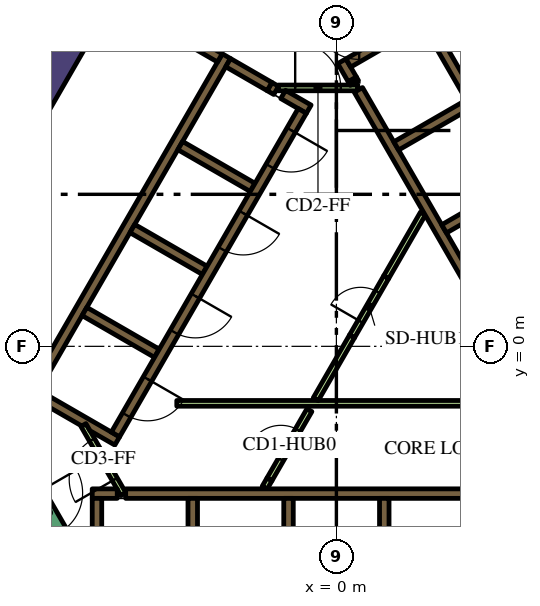
"""IFC4 building model, lengths in metres.
Left out: names, types, materials, properties, quantities, classifications, styles, units other than length and angle.
Written with IfcOpenShell. Run it as: python <this file> out.ifc"""

import sys

from ifc_helpers import new_model, si_unit, direction, frame, frame_2d, origin, place, context, subcontext, project, spatial, polyline, rectangle, outline, extrude, element, fill, save


model = new_model("IFC4")
c1 = context("Model", 3, precision=1e-05, world=origin(), true_north=direction((0.0, 1.0)))
c2 = subcontext(c1, "Body", "Model", "MODEL_VIEW")
j1 = project(units=[si_unit("LENGTHUNIT", "METRE"), si_unit("PLANEANGLEUNIT", "RADIAN")], contexts=[c1])
p1 = place(None, origin())
s1 = spatial("IfcSite", under=j1, at=p1, CompositionType="ELEMENT")
p2 = place(p1, origin())
s2 = spatial("IfcBuilding", under=s1, at=p2, CompositionType="ELEMENT")
p3 = place(p2, frame((0.0, 0.0, 166.8)))
s3 = spatial("IfcBuildingStorey", under=s2, at=p3, CompositionType="ELEMENT", Elevation=166.8)
p4 = place(p3, frame((8.279, 5.761, 0.0), z_axis=(0.0, 0.0, 1.0), x_axis=(-0.500010359015, 0.866019422922, 0.0)))
e1 = element("IfcWall", 1, at=p4, inside=s3, PredefinedType="SOLIDWALL", context=c2, shape_type="SweptSolid", body=[
    extrude(rectangle(XDim=12.528, YDim=0.8, at=frame_2d((6.264, 0.0))), origin(), (0.0, 0.0, 1.0), 4.2),
])
p5 = place(p3, frame((-12.668, -1.842, 0.0), z_axis=(0.0, 0.0, 1.0), x_axis=(0.500003640647, 0.866023301845, 0.0)))
e2 = element("IfcWall", 2, at=p5, inside=s3, PredefinedType="SOLIDWALL", context=c2, shape_type="SweptSolid", body=[
    extrude(rectangle(XDim=15.858, YDim=0.8, at=frame_2d((7.929, 0.0))), origin(), (0.0, 0.0, 1.0), 4.2),
])
p6 = place(p3, frame((-5.545, -3.875, 0.0), z_axis=(0.0, 0.0, 1.0), x_axis=(1.0, 0.0, 0.0)))
e3 = element("IfcWall", 3, at=p6, inside=s3, PredefinedType="SOLIDWALL", context=c2, shape_type="SweptSolid", body=[
    extrude(rectangle(XDim=11.97, YDim=0.25, at=frame_2d((5.985, 0.0))), origin(), (0.0, 0.0, 1.0), 4.2),
])
p7 = place(p3, frame((-6.425, -3.875, 0.0), z_axis=(0.0, 0.0, 1.0), x_axis=(1.0, 0.0, 0.0)))
e4 = element("IfcWall", 4, at=p7, inside=s3, PredefinedType="SOLIDWALL", context=c2, shape_type="SweptSolid", body=[
    extrude(rectangle(XDim=0.658, YDim=0.25, at=frame_2d((0.329, 0.0))), origin(), (0.0, 0.0, 1.0), 4.2),
])
for number, where, z_axis, x_axis in (
    (5, (1.26, -4.0, 0.0), (0.0, 0.0, 1.0), (0.0, -1.0, 0.0)),
    (6, (-1.26, -4.0, 0.0), (0.0, 0.0, 1.0), (0.0, -1.0, 0.0)),
    (7, (-3.78, -4.0, 0.0), (0.0, 0.0, 1.0), (0.0, -1.0, 0.0)),
):
    element("IfcWall", number, at=place(p3, frame(where, z_axis=z_axis, x_axis=x_axis)), inside=s3, PredefinedType="SOLIDWALL", context=c2, shape_type="SweptSolid", body=[
        extrude(rectangle(XDim=2.2, YDim=0.25, at=frame_2d((1.1, 0.0))), origin(), (0.0, 0.0, 1.0), 4.2),
    ])
p8 = place(p3, frame((-6.3, -7.125, 0.0), z_axis=(0.0, 0.0, 1.0), x_axis=(0.0, 1.0, 0.0)))
e8 = element("IfcWall", 8, at=p8, inside=s3, PredefinedType="SOLIDWALL", context=c2, shape_type="SweptSolid", body=[
    extrude(rectangle(XDim=3.125, YDim=0.25, at=frame_2d((1.562, 0.0))), origin(), (0.0, 0.0, 1.0), 4.2),
])
p9 = place(p3, frame((0.473, 6.93, 0.0), z_axis=(0.0, 0.0, 1.0), x_axis=(-0.49972245349, 0.866185586049, 0.0)))
e9 = element("IfcWall", 9, at=p9, inside=s3, PredefinedType="SOLIDWALL", context=c2, shape_type="SweptSolid", body=[
    extrude(rectangle(XDim=0.11, YDim=0.25, at=frame_2d((0.055, 0.0))), origin(), (0.0, 0.0, 1.0), 4.2),
])
p10 = place(p3, frame((6.568, -3.627, 0.0), z_axis=(0.0, 0.0, 1.0), x_axis=(-0.499999455981, 0.866025717874, 0.0)))
e10 = element("IfcWall", 10, at=p10, inside=s3, PredefinedType="SOLIDWALL", context=c2, shape_type="SweptSolid", body=[
    extrude(rectangle(XDim=11.978, YDim=0.25, at=frame_2d((5.989, 0.0))), origin(), (0.0, 0.0, 1.0), 4.2),
])
p11 = place(p3, frame((0.417, 7.027, 0.0), z_axis=(0.0, 0.0, 1.0), x_axis=(-0.500210807569, 0.865903659763, 0.0)))
e11 = element("IfcWall", 11, at=p11, inside=s3, PredefinedType="SOLIDWALL", context=c2, shape_type="SweptSolid", body=[
    extrude(rectangle(XDim=0.548, YDim=0.25, at=frame_2d((0.274, 0.0))), origin(), (0.0, 0.0, 1.0), 4.2),
])
p12 = place(p3, frame((3.1, 9.064, 0.0), z_axis=(0.0, 0.0, 1.0), x_axis=(-0.866030133475, -0.499991807846, 0.0)))
e12 = element("IfcWall", 12, at=p12, inside=s3, PredefinedType="SOLIDWALL", context=c2, shape_type="SweptSolid", body=[
    extrude(rectangle(XDim=3.217, YDim=0.25, at=frame_2d((1.608, 0.0))), origin(), (0.0, 0.0, 1.0), 4.2),
])
p13 = place(p3, frame((1.574, 5.274, 0.0), z_axis=(0.0, 0.0, 1.0), x_axis=(0.866028486751, 0.499994660107, 0.0)))
e13 = element("IfcWall", 13, at=p13, inside=s3, PredefinedType="SOLIDWALL", context=c2, shape_type="SweptSolid", body=[
    extrude(rectangle(XDim=2.2, YDim=0.25, at=frame_2d((1.1, 0.0))), origin(), (0.0, 0.0, 1.0), 4.2),
])
p14 = place(p3, frame((2.834, 3.091, 0.0), z_axis=(0.0, 0.0, 1.0), x_axis=(0.866008176907, 0.50002983664, 0.0)))
e14 = element("IfcWall", 14, at=p14, inside=s3, PredefinedType="SOLIDWALL", context=c2, shape_type="SweptSolid", body=[
    extrude(rectangle(XDim=2.2, YDim=0.25, at=frame_2d((1.1, 0.0))), origin(), (0.0, 0.0, 1.0), 4.2),
])
p15 = place(p3, frame((-8.06, -1.311, 0.0), z_axis=(0.0, 0.0, 1.0), x_axis=(0.50000273126, 0.866023826885, 0.0)))
e15 = element("IfcWall", 15, at=p15, inside=s3, PredefinedType="SOLIDWALL", context=c2, shape_type="SweptSolid", body=[
    extrude(rectangle(XDim=10.33, YDim=0.25, at=frame_2d((5.165, 0.0))), origin(), (0.0, 0.0, 1.0), 4.2),
])
p16 = place(p3, frame((-1.758, 6.835, 0.0), z_axis=(0.0, 0.0, 1.0), x_axis=(0.865982457891, -0.500074377092, 0.0)))
e16 = element("IfcWall", 16, at=p16, inside=s3, PredefinedType="SOLIDWALL", context=c2, shape_type="SweptSolid", body=[
    extrude(rectangle(XDim=0.2, YDim=0.25, at=frame_2d((0.1, 0.0))), origin(), (0.0, 0.0, 1.0), 4.2),
])
p17 = place(p3, frame((-1.76, 6.836, 0.0), z_axis=(0.0, 0.0, 1.0), x_axis=(-0.865952863304, 0.500125622755, 0.0)))
e17 = element("IfcWall", 17, at=p17, inside=s3, PredefinedType="SOLIDWALL", context=c2, shape_type="SweptSolid", body=[
    extrude(rectangle(XDim=1.258, YDim=0.25, at=frame_2d((0.629, 0.0))), origin(), (0.0, 0.0, 1.0), 4.2),
])
p18 = place(p3, frame((-0.728, 6.24, 0.0), z_axis=(0.0, 0.0, 1.0), x_axis=(-0.865955664968, 0.500120771724, 0.0)))
e18 = element("IfcWall", 18, at=p18, inside=s3, PredefinedType="SOLIDWALL", context=c2, shape_type="SweptSolid", body=[
    extrude(rectangle(XDim=0.778, YDim=0.25, at=frame_2d((0.389, 0.0))), origin(), (0.0, 0.0, 1.0), 4.2),
])
for number, where, z_axis, x_axis in (
    (19, (-2.204, 4.182, 0.0), (0.0, 0.0, 1.0), (-0.866, 0.5, 0.0)),
    (20, (-5.369, 3.1, 0.0), (0.0, 0.0, 1.0), (0.866, -0.5, 0.0)),
    (21, (-4.724, -0.182, 0.0), (0.0, 0.0, 1.0), (-0.866, 0.5, 0.0)),
):
    element("IfcWall", number, at=place(p3, frame(where, z_axis=z_axis, x_axis=x_axis)), inside=s3, PredefinedType="SOLIDWALL", context=c2, shape_type="SweptSolid", body=[
        extrude(rectangle(XDim=2.2, YDim=0.25, at=frame_2d((1.1, 0.0))), origin(), (0.0, 0.0, 1.0), 4.2),
    ])
p19 = place(p3, origin())
e22 = element("IfcWall", 22, at=p19, inside=s3, PredefinedType="SOLIDWALL", context=c2, shape_type="SweptSolid", body=[
    extrude(outline(polyline([(-5.922, -2.257), (-5.922, -2.257), (-5.705, -2.382), (-5.83, -2.598), (-6.483, -2.221), (-6.591, -2.033), (-6.591, -2.033), (-6.7, -2.096), (-7.952, -1.373), (-7.827, -1.156), (-5.922, -2.257)])), origin(), (0.0, 0.0, 1.0), 4.2),
])
p20 = place(p3, frame((-3.066, 7.59, 0.0), z_axis=(0.0, 0.0, 1.0), x_axis=(-0.866081358704, 0.49990307071, 0.0)))
e23 = element("IfcWall", 23, at=p20, inside=s3, PredefinedType="SOLIDWALL", context=c2, shape_type="SweptSolid", body=[
    extrude(rectangle(XDim=0.858, YDim=0.25, at=frame_2d((0.429, 0.0))), origin(), (0.0, 0.0, 1.0), 4.2),
])
p21 = place(p3, frame((-4.2, -1.5, 0.0), z_axis=(0.0, 0.0, 1.0), x_axis=(1.0, 0.0, 0.0)))
e24 = element("IfcWall", 24, at=p21, inside=s3, PredefinedType="PARTITIONING", context=c2, shape_type="SweptSolid", body=[
    extrude(rectangle(XDim=9.359, YDim=0.15, at=frame_2d((4.68, 0.0))), origin(), (0.0, 0.0, 1.0), 3.15),
])
p22 = place(p3, frame((-0.544, -1.393, 0.0), z_axis=(0.0, 0.0, 1.0), x_axis=(0.499928740635, 0.866066541489, 0.0)))
e25 = element("IfcWall", 25, at=p22, inside=s3, PredefinedType="PARTITIONING", context=c2, shape_type="SweptSolid", body=[
    extrude(rectangle(XDim=1.912, YDim=0.15, at=frame_2d((0.956, 0.0))), origin(), (0.0, 0.0, 1.0), 3.15),
])
p23 = place(p3, frame((1.312, 1.822, 0.0), z_axis=(0.0, 0.0, 1.0), x_axis=(0.500003549559, 0.866023354436, 0.0)))
e26 = element("IfcWall", 26, at=p23, inside=s3, PredefinedType="PARTITIONING", context=c2, shape_type="SweptSolid", body=[
    extrude(rectangle(XDim=1.93, YDim=0.15, at=frame_2d((0.965, 0.0))), origin(), (0.0, 0.0, 1.0), 3.15),
])
p24 = place(p3, frame((-1.887, -3.718, 0.0), z_axis=(0.0, 0.0, 1.0), x_axis=(0.500165633897, 0.865929753888, 0.0)))
e27 = element("IfcWall", 27, at=p24, inside=s3, PredefinedType="PARTITIONING", context=c2, shape_type="SweptSolid", body=[
    extrude(rectangle(XDim=0.254, YDim=0.15, at=frame_2d((0.127, 0.0))), origin(), (0.0, 0.0, 1.0), 3.15),
])
p25 = place(p3, frame((8.565, -2.185, 0.0), z_axis=(0.0, 0.0, 1.0), x_axis=(-0.499997954832, 0.866026584559, 0.0)))
e28 = element("IfcWall", 28, at=p25, inside=s3, PredefinedType="SOLIDWALL", context=c2, shape_type="SweptSolid", body=[
    extrude(rectangle(XDim=12.35, YDim=0.25, at=frame_2d((6.175, 0.0))), origin(), (0.0, 0.0, 1.0), 4.2),
])
p26 = place(p25, frame((0.585, 0.0, 0.0)))
e29 = element("IfcOpeningElement", 29, at=p26, cuts=e28, PredefinedType="OPENING", context=c2, shape_type="SweptSolid", body=[
    extrude(rectangle(XDim=1.1, YDim=2.1, at=frame_2d((0.55, 1.05))), frame((0.0, 0.135, 0.0), z_axis=(0.0, -1.0, 0.0), x_axis=(1.0, 0.0, 0.0)), (0.0, 0.0, 1.0), 0.27),
])
p27 = place(p3, frame((-0.898, 6.194, 0.0), z_axis=(0.0, 0.0, 1.0), x_axis=(-0.499996202215, -0.866027596426, 0.0)))
e30 = element("IfcWall", 30, at=p27, inside=s3, PredefinedType="SOLIDWALL", context=c2, shape_type="SweptSolid", body=[
    extrude(rectangle(XDim=9.83, YDim=0.25, at=frame_2d((4.915, 0.0))), origin(), (0.0, 0.0, 1.0), 4.2),
])
p28 = place(p27, frame((0.585, 0.0, 0.0)))
e31 = element("IfcOpeningElement", 31, at=p28, cuts=e30, PredefinedType="OPENING", context=c2, shape_type="SweptSolid", body=[
    extrude(rectangle(XDim=1.1, YDim=2.1, at=frame_2d((0.55, 1.05))), frame((0.0, 0.135, 0.0), z_axis=(0.0, -1.0, 0.0), x_axis=(1.0, 0.0, 0.0)), (0.0, 0.0, 1.0), 0.27),
])
p29 = place(p27, frame((3.105, 0.0, 0.0)))
e32 = element("IfcOpeningElement", 32, at=p29, cuts=e30, PredefinedType="OPENING", context=c2, shape_type="SweptSolid", body=[
    extrude(rectangle(XDim=1.1, YDim=2.1, at=frame_2d((0.55, 1.05))), frame((0.0, 0.135, 0.0), z_axis=(0.0, -1.0, 0.0), x_axis=(1.0, 0.0, 0.0)), (0.0, 0.0, 1.0), 0.27),
])
p30 = place(p27, frame((5.625, 0.0, 0.0)))
e33 = element("IfcOpeningElement", 33, at=p30, cuts=e30, PredefinedType="OPENING", context=c2, shape_type="SweptSolid", body=[
    extrude(rectangle(XDim=1.1, YDim=2.1, at=frame_2d((0.55, 1.05))), frame((0.0, 0.135, 0.0), z_axis=(0.0, -1.0, 0.0), x_axis=(1.0, 0.0, 0.0)), (0.0, 0.0, 1.0), 0.27),
])
p31 = place(p27, frame((8.145, 0.0, 0.0)))
e34 = element("IfcOpeningElement", 34, at=p31, cuts=e30, PredefinedType="OPENING", context=c2, shape_type="SweptSolid", body=[
    extrude(rectangle(XDim=1.1, YDim=2.1, at=frame_2d((0.55, 1.05))), frame((0.0, 0.135, 0.0), z_axis=(0.0, -1.0, 0.0), x_axis=(1.0, 0.0, 0.0)), (0.0, 0.0, 1.0), 0.27),
])
p32 = place(p3, frame((-8.103, -3.466, 0.0), z_axis=(0.0, 0.0, 1.0), x_axis=(0.500078061341, -0.865980330357, 0.0)))
e35 = element("IfcWall", 35, at=p32, inside=s3, PredefinedType="SOLIDWALL", context=c2, shape_type="SweptSolid", body=[
    extrude(rectangle(XDim=2.1, YDim=0.4, at=frame_2d((1.05, 0.0))), origin(), (0.0, 0.0, 1.0), 4.2),
])
p33 = place(p32, frame((0.45, 0.0, 0.0)))
e36 = element("IfcOpeningElement", 36, at=p33, cuts=e35, PredefinedType="OPENING", context=c2, shape_type="SweptSolid", body=[
    extrude(rectangle(XDim=1.2, YDim=2.1, at=frame_2d((0.6, 1.05))), frame((0.0, 0.21, 0.0), z_axis=(0.0, -1.0, 0.0), x_axis=(1.0, 0.0, 0.0)), (0.0, 0.0, 1.0), 0.42),
])
p34 = place(p3, frame((-1.76, -3.498, 0.0), z_axis=(0.0, 0.0, 1.0), x_axis=(0.499977374825, 0.866038466041, 0.0)))
e37 = element("IfcWall", 37, at=p34, inside=s3, PredefinedType="PARTITIONING", context=c2, shape_type="SweptSolid", body=[
    extrude(rectangle(XDim=2.1, YDim=0.15, at=frame_2d((1.05, 0.0))), origin(), (0.0, 0.0, 1.0), 3.15),
])
p35 = place(p34, frame((0.6, 0.0, 0.0)))
e38 = element("IfcOpeningElement", 38, at=p35, cuts=e37, PredefinedType="OPENING", context=c2, shape_type="SweptSolid", body=[
    extrude(rectangle(XDim=0.9, YDim=2.1, at=frame_2d((0.45, 1.05))), frame((0.0, 0.085, 0.0), z_axis=(0.0, -1.0, 0.0), x_axis=(1.0, 0.0, 0.0)), (0.0, 0.0, 1.0), 0.17),
])
p36 = place(p3, frame((-1.534, 6.8, 0.0), z_axis=(0.0, 0.0, 1.0), x_axis=(1.0, 0.0, 0.0)))
e39 = element("IfcWall", 39, at=p36, inside=s3, PredefinedType="PARTITIONING", context=c2, shape_type="SweptSolid", body=[
    extrude(rectangle(XDim=2.1, YDim=0.15, at=frame_2d((1.05, 0.0))), origin(), (0.0, 0.0, 1.0), 3.15),
])
p37 = place(p36, frame((0.45, 0.0, 0.0)))
e40 = element("IfcOpeningElement", 40, at=p37, cuts=e39, PredefinedType="OPENING", context=c2, shape_type="SweptSolid", body=[
    extrude(rectangle(XDim=1.2, YDim=2.1, at=frame_2d((0.6, 1.05))), frame((0.0, 0.085, 0.0), z_axis=(0.0, -1.0, 0.0), x_axis=(1.0, 0.0, 0.0)), (0.0, 0.0, 1.0), 0.17),
])
p38 = place(p3, frame((-5.606, -3.89, 0.0), z_axis=(0.0, 0.0, 1.0), x_axis=(-0.500027713859, 0.866009402589, 0.0)))
e41 = element("IfcWall", 41, at=p38, inside=s3, PredefinedType="PARTITIONING", context=c2, shape_type="SweptSolid", body=[
    extrude(rectangle(XDim=2.1, YDim=0.15, at=frame_2d((1.05, 0.0))), origin(), (0.0, 0.0, 1.0), 3.15),
])
p39 = place(p38, frame((0.45, 0.0, 0.0)))
e42 = element("IfcOpeningElement", 42, at=p39, cuts=e41, PredefinedType="OPENING", context=c2, shape_type="SweptSolid", body=[
    extrude(rectangle(XDim=1.2, YDim=2.1, at=frame_2d((0.6, 1.05))), frame((0.0, 0.085, 0.0), z_axis=(0.0, -1.0, 0.0), x_axis=(1.0, 0.0, 0.0)), (0.0, 0.0, 1.0), 0.17),
])
p40 = place(p3, frame((0.412, 0.263, 0.0), z_axis=(0.0, 0.0, 1.0), x_axis=(0.500062916607, 0.865989075817, 0.0)))
e43 = element("IfcWall", 43, at=p40, inside=s3, PredefinedType="PARTITIONING", context=c2, shape_type="SweptSolid", body=[
    extrude(rectangle(XDim=1.8, YDim=0.15, at=frame_2d((0.9, 0.0))), origin(), (0.0, 0.0, 1.0), 3.15),
])
p41 = place(p40, frame((0.45, 0.0, 0.0)))
e44 = element("IfcOpeningElement", 44, at=p41, cuts=e43, PredefinedType="OPENING", context=c2, shape_type="SweptSolid", body=[
    extrude(rectangle(XDim=0.9, YDim=2.1, at=frame_2d((0.45, 1.05))), frame((0.0, 0.085, 0.0), z_axis=(0.0, -1.0, 0.0), x_axis=(1.0, 0.0, 0.0)), (0.0, 0.0, 1.0), 0.17),
])
p42 = place(p28, origin())
e45 = element("IfcDoor", 45, at=p42, inside=s3, OperationType="DOUBLE_DOOR_SLIDING", PredefinedType="DOOR", context=c2, shape_type="SweptSolid", body=[
    extrude(rectangle(XDim=1.1, YDim=2.1, at=frame_2d((0.55, 1.05))), frame((0.0, 0.025, 0.0), z_axis=(0.0, -1.0, 0.0), x_axis=(1.0, 0.0, 0.0)), (0.0, 0.0, 1.0), 0.05),
])
fill(e31, e45)
p43 = place(p29, origin())
e46 = element("IfcDoor", 46, at=p43, inside=s3, OperationType="DOUBLE_DOOR_SLIDING", PredefinedType="DOOR", context=c2, shape_type="SweptSolid", body=[
    extrude(rectangle(XDim=1.1, YDim=2.1, at=frame_2d((0.55, 1.05))), frame((0.0, 0.025, 0.0), z_axis=(0.0, -1.0, 0.0), x_axis=(1.0, 0.0, 0.0)), (0.0, 0.0, 1.0), 0.05),
])
fill(e32, e46)
p44 = place(p30, origin())
e47 = element("IfcDoor", 47, at=p44, inside=s3, OperationType="DOUBLE_DOOR_SLIDING", PredefinedType="DOOR", context=c2, shape_type="SweptSolid", body=[
    extrude(rectangle(XDim=1.1, YDim=2.1, at=frame_2d((0.55, 1.05))), frame((0.0, 0.025, 0.0), z_axis=(0.0, -1.0, 0.0), x_axis=(1.0, 0.0, 0.0)), (0.0, 0.0, 1.0), 0.05),
])
fill(e33, e47)
p45 = place(p31, origin())
e48 = element("IfcDoor", 48, at=p45, inside=s3, OperationType="DOUBLE_DOOR_SLIDING", PredefinedType="DOOR", context=c2, shape_type="SweptSolid", body=[
    extrude(rectangle(XDim=1.1, YDim=2.1, at=frame_2d((0.55, 1.05))), frame((0.0, 0.025, 0.0), z_axis=(0.0, -1.0, 0.0), x_axis=(1.0, 0.0, 0.0)), (0.0, 0.0, 1.0), 0.05),
])
fill(e34, e48)
p46 = place(p33, origin())
e49 = element("IfcDoor", 49, at=p46, inside=s3, OperationType="SINGLE_SWING_LEFT", PredefinedType="DOOR", context=c2, shape_type="SweptSolid", body=[
    extrude(rectangle(XDim=1.2, YDim=2.1, at=frame_2d((0.6, 1.05))), frame((0.0, 0.025, 0.0), z_axis=(0.0, -1.0, 0.0), x_axis=(1.0, 0.0, 0.0)), (0.0, 0.0, 1.0), 0.05),
])
fill(e36, e49)
p47 = place(p35, origin())
e50 = element("IfcDoor", 50, at=p47, inside=s3, OperationType="SINGLE_SWING_LEFT", PredefinedType="DOOR", context=c2, shape_type="SweptSolid", body=[
    extrude(rectangle(XDim=0.9, YDim=2.1, at=frame_2d((0.45, 1.05))), frame((0.0, 0.025, 0.0), z_axis=(0.0, -1.0, 0.0), x_axis=(1.0, 0.0, 0.0)), (0.0, 0.0, 1.0), 0.05),
])
fill(e38, e50)
p48 = place(p37, origin())
e51 = element("IfcDoor", 51, at=p48, inside=s3, OperationType="SINGLE_SWING_LEFT", PredefinedType="DOOR", context=c2, shape_type="SweptSolid", body=[
    extrude(rectangle(XDim=1.2, YDim=2.1, at=frame_2d((0.6, 1.05))), frame((0.0, 0.025, 0.0), z_axis=(0.0, -1.0, 0.0), x_axis=(1.0, 0.0, 0.0)), (0.0, 0.0, 1.0), 0.05),
])
fill(e40, e51)
p49 = place(p39, origin())
e52 = element("IfcDoor", 52, at=p49, inside=s3, OperationType="SINGLE_SWING_LEFT", PredefinedType="DOOR", context=c2, shape_type="SweptSolid", body=[
    extrude(rectangle(XDim=1.2, YDim=2.1, at=frame_2d((0.6, 1.05))), frame((0.0, 0.025, 0.0), z_axis=(0.0, -1.0, 0.0), x_axis=(1.0, 0.0, 0.0)), (0.0, 0.0, 1.0), 0.05),
])
fill(e42, e52)
p50 = place(p41, origin())
e53 = element("IfcDoor", 53, at=p50, inside=s3, OperationType="SINGLE_SWING_LEFT", PredefinedType="DOOR", context=c2, shape_type="SweptSolid", body=[
    extrude(rectangle(XDim=0.9, YDim=2.1, at=frame_2d((0.45, 1.05))), frame((0.0, 0.025, 0.0), z_axis=(0.0, -1.0, 0.0), x_axis=(1.0, 0.0, 0.0)), (0.0, 0.0, 1.0), 0.05),
])
fill(e44, e53)
save(model, sys.argv[1])
